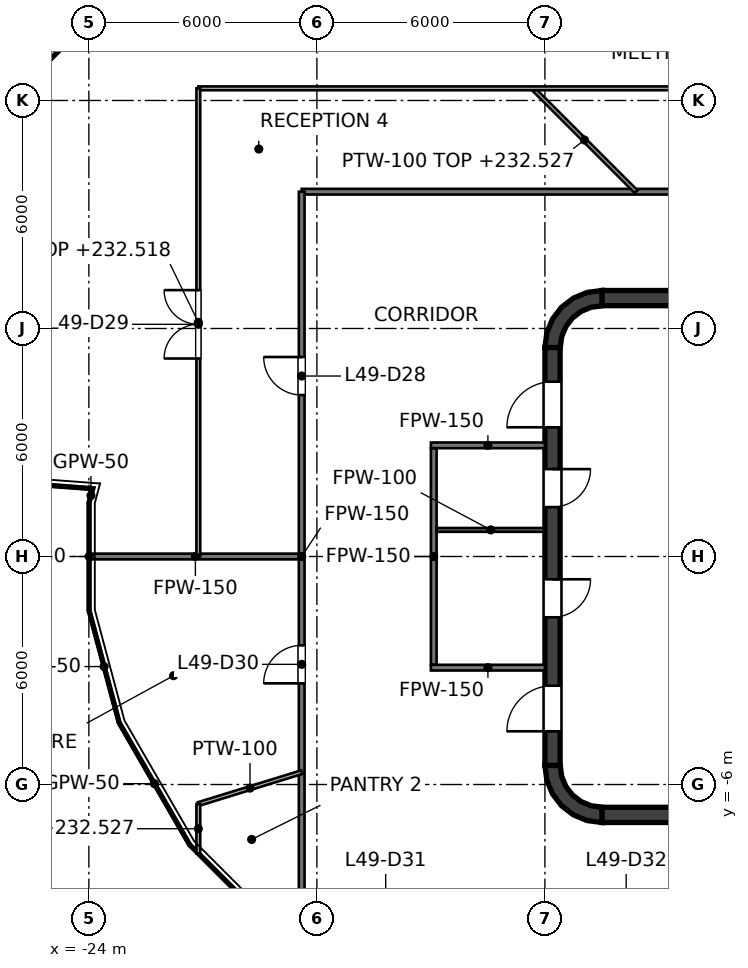
"""IFC4 building model, lengths in metres.
Left out: names, types, materials, properties, quantities, classifications, styles, units other than length and angle.
Written with IfcOpenShell. Run it as: python <this file> out.ifc"""

import sys

from ifc_helpers import new_model, si_unit, direction, frame, frame_2d, origin, place, context, subcontext, project, spatial, polyline, rectangle, outline, extrude, element, fill, save


model = new_model("IFC4")
c1 = context("Model", 3, precision=1e-05, world=origin(), true_north=direction((0.0, 1.0)))
c2 = subcontext(c1, "Body", "Model", "MODEL_VIEW")
j1 = project(units=[si_unit("LENGTHUNIT", "METRE"), si_unit("PLANEANGLEUNIT", "RADIAN")], contexts=[c1])
p1 = place(None, origin())
s1 = spatial("IfcSite", under=j1, at=p1, CompositionType="ELEMENT")
p2 = place(p1, origin())
s2 = spatial("IfcBuilding", under=s1, at=p2, CompositionType="ELEMENT")
p3 = place(p2, frame((0.0, 0.0, 229.6)))
s3 = spatial("IfcBuildingStorey", under=s2, at=p3, CompositionType="ELEMENT", Elevation=229.6)
for number, where, z_axis, x_axis in (
    (1, (-10.5, 6.8, 0.0), (0.0, 0.0, 1.0), (1.0, 0.0, 0.0)),
    (2, (-10.5, -6.8, 0.0), (0.0, 0.0, 1.0), (1.0, 0.0, 0.0)),
):
    element("IfcWall", number, at=place(p3, frame(where, z_axis=z_axis, x_axis=x_axis)), inside=s3, PredefinedType="SHEAR", context=c2, shape_type="SweptSolid", body=[
        extrude(rectangle(XDim=21.0, YDim=0.4, at=frame_2d((10.5, 0.0))), origin(), (0.0, 0.0, 1.0), 4.0),
    ])
p4 = place(p3, frame((-11.8, -5.5, 0.0), z_axis=(0.0, 0.0, 1.0), x_axis=(0.0, 1.0, 0.0)))
e3 = element("IfcWall", 3, at=p4, inside=s3, PredefinedType="SHEAR", context=c2, shape_type="SweptSolid", body=[
    extrude(rectangle(XDim=11.0, YDim=0.4, at=frame_2d((5.5, 0.0))), origin(), (0.0, 0.0, 1.0), 4.0),
])
p5 = place(p4, frame((3.9, 0.0, 0.0)))
e4 = element("IfcOpeningElement", 4, at=p5, cuts=e3, PredefinedType="OPENING", context=c2, shape_type="SweptSolid", body=[
    extrude(rectangle(XDim=1.0, YDim=2.1, at=frame_2d((0.5, 1.05))), frame((0.0, 0.2, 0.0), z_axis=(0.0, -1.0, 0.0), x_axis=(1.0, 0.0, 0.0)), (0.0, 0.0, 1.0), 0.4),
])
p6 = place(p4, frame((6.8, 0.0, 0.0)))
e5 = element("IfcOpeningElement", 5, at=p6, cuts=e3, PredefinedType="OPENING", context=c2, shape_type="SweptSolid", body=[
    extrude(rectangle(XDim=1.0, YDim=2.1, at=frame_2d((0.5, 1.05))), frame((0.0, 0.2, 0.0), z_axis=(0.0, -1.0, 0.0), x_axis=(1.0, 0.0, 0.0)), (0.0, 0.0, 1.0), 0.4),
])
p7 = place(p4, frame((0.9, 0.0, 0.0)))
e6 = element("IfcOpeningElement", 6, at=p7, cuts=e3, PredefinedType="OPENING", context=c2, shape_type="SweptSolid", body=[
    extrude(rectangle(XDim=1.2, YDim=2.1, at=frame_2d((0.6, 1.05))), frame((0.0, 0.2, 0.0), z_axis=(0.0, -1.0, 0.0), x_axis=(1.0, 0.0, 0.0)), (0.0, 0.0, 1.0), 0.4),
])
p8 = place(p4, frame((8.9, 0.0, 0.0)))
e7 = element("IfcOpeningElement", 7, at=p8, cuts=e3, PredefinedType="OPENING", context=c2, shape_type="SweptSolid", body=[
    extrude(rectangle(XDim=1.2, YDim=2.1, at=frame_2d((0.6, 1.05))), frame((0.0, 0.2, 0.0), z_axis=(0.0, -1.0, 0.0), x_axis=(1.0, 0.0, 0.0)), (0.0, 0.0, 1.0), 0.4),
])
p9 = place(p3, origin())
e8 = element("IfcWall", 8, at=p9, inside=s3, PredefinedType="SHEAR", context=c2, shape_type="SweptSolid", body=[
    extrude(outline(polyline([(-12.0, 5.5), (-11.596, 5.5), (-11.559, 5.784), (-11.45, 6.048), (-11.275, 6.275), (-11.048, 6.45), (-10.784, 6.559), (-10.5, 6.596), (-10.5, 7.0), (-10.888, 6.949), (-11.25, 6.799), (-11.561, 6.561), (-11.799, 6.25), (-11.949, 5.888), (-12.0, 5.5)])), origin(), (0.0, 0.0, 1.0), 4.0),
])
e9 = element("IfcWall", 9, at=p9, inside=s3, PredefinedType="SHEAR", context=c2, shape_type="SweptSolid", body=[
    extrude(outline(polyline([(-10.5, -7.0), (-10.5, -6.596), (-10.784, -6.559), (-11.048, -6.45), (-11.275, -6.275), (-11.45, -6.048), (-11.559, -5.784), (-11.596, -5.5), (-12.0, -5.5), (-11.949, -5.888), (-11.799, -6.25), (-11.561, -6.561), (-11.25, -6.799), (-10.888, -6.949), (-10.5, -7.0)])), origin(), (0.0, 0.0, 1.0), 4.0),
])
p10 = place(p3, frame((-9.0, 4.1, 0.0), z_axis=(0.0, 0.0, 1.0), x_axis=(0.0, 1.0, 0.0)))
e10 = element("IfcWall", 10, at=p10, inside=s3, PredefinedType="SOLIDWALL", context=c2, shape_type="SweptSolid", body=[
    extrude(rectangle(XDim=2.5, YDim=0.25, at=frame_2d((1.25, 0.0))), origin(), (0.0, 0.0, 1.0), 3.85),
])
p11 = place(p10, frame((0.65, 0.0, 0.0)))
e11 = element("IfcOpeningElement", 11, at=p11, cuts=e10, PredefinedType="OPENING", context=c2, shape_type="SweptSolid", body=[
    extrude(rectangle(XDim=1.2, YDim=2.1, at=frame_2d((0.6, 1.05))), frame((0.0, 0.125, 0.0), z_axis=(0.0, -1.0, 0.0), x_axis=(1.0, 0.0, 0.0)), (0.0, 0.0, 1.0), 0.25),
])
p12 = place(p3, frame((-9.0, -6.6, 0.0), z_axis=(0.0, 0.0, 1.0), x_axis=(0.0, 1.0, 0.0)))
e12 = element("IfcWall", 12, at=p12, inside=s3, PredefinedType="PARTITIONING", context=c2, shape_type="SweptSolid", body=[
    extrude(rectangle(XDim=2.5, YDim=0.25, at=frame_2d((1.25, 0.0))), origin(), (0.0, 0.0, 1.0), 3.85),
])
p13 = place(p12, frame((0.75, 0.0, 0.0)))
e13 = element("IfcOpeningElement", 13, at=p13, cuts=e12, PredefinedType="OPENING", context=c2, shape_type="SweptSolid", body=[
    extrude(rectangle(XDim=1.0, YDim=2.1, at=frame_2d((0.5, 1.05))), frame((0.0, 0.125, 0.0), z_axis=(0.0, -1.0, 0.0), x_axis=(1.0, 0.0, 0.0)), (0.0, 0.0, 1.0), 0.25),
])
p14 = place(p3, frame((-9.125, 1.525, 0.0), z_axis=(0.0, 0.0, 1.0), x_axis=(1.0, 0.0, 0.0)))
e14 = element("IfcWall", 14, at=p14, inside=s3, PredefinedType="SOLIDWALL", context=c2, shape_type="SweptSolid", body=[
    extrude(rectangle(XDim=8.35, YDim=0.25, at=frame_2d((4.175, 0.0))), origin(), (0.0, 0.0, 1.0), 3.85),
])
p15 = place(p14, frame((0.925, 0.0, 0.0)))
e15 = element("IfcOpeningElement", 15, at=p15, cuts=e14, PredefinedType="OPENING", context=c2, shape_type="SweptSolid", body=[
    extrude(rectangle(XDim=1.1, YDim=2.1, at=frame_2d((0.55, 1.05))), frame((0.0, 0.125, 0.0), z_axis=(0.0, -1.0, 0.0), x_axis=(1.0, 0.0, 0.0)), (0.0, 0.0, 1.0), 0.25),
])
p16 = place(p14, frame((3.625, 0.0, 0.0)))
e16 = element("IfcOpeningElement", 16, at=p16, cuts=e14, PredefinedType="OPENING", context=c2, shape_type="SweptSolid", body=[
    extrude(rectangle(XDim=1.1, YDim=2.1, at=frame_2d((0.55, 1.05))), frame((0.0, 0.125, 0.0), z_axis=(0.0, -1.0, 0.0), x_axis=(1.0, 0.0, 0.0)), (0.0, 0.0, 1.0), 0.25),
])
p17 = place(p14, frame((6.325, 0.0, 0.0)))
e17 = element("IfcOpeningElement", 17, at=p17, cuts=e14, PredefinedType="OPENING", context=c2, shape_type="SweptSolid", body=[
    extrude(rectangle(XDim=1.1, YDim=2.1, at=frame_2d((0.55, 1.05))), frame((0.0, 0.125, 0.0), z_axis=(0.0, -1.0, 0.0), x_axis=(1.0, 0.0, 0.0)), (0.0, 0.0, 1.0), 0.25),
])
p18 = place(p3, frame((-9.125, 3.975, 0.0), z_axis=(0.0, 0.0, 1.0), x_axis=(1.0, 0.0, 0.0)))
e18 = element("IfcWall", 18, at=p18, inside=s3, PredefinedType="SOLIDWALL", context=c2, shape_type="SweptSolid", body=[
    extrude(rectangle(XDim=8.35, YDim=0.25, at=frame_2d((4.175, 0.0))), origin(), (0.0, 0.0, 1.0), 3.85),
])
p19 = place(p3, frame((-9.0, 1.65, 0.0), z_axis=(0.0, 0.0, 1.0), x_axis=(0.0, 1.0, 0.0)))
e19 = element("IfcWall", 19, at=p19, inside=s3, PredefinedType="SOLIDWALL", context=c2, shape_type="SweptSolid", body=[
    extrude(rectangle(XDim=2.2, YDim=0.25, at=frame_2d((1.1, 0.0))), origin(), (0.0, 0.0, 1.0), 3.85),
])
p20 = place(p3, frame((-9.125, -1.525, 0.0), z_axis=(0.0, 0.0, 1.0), x_axis=(1.0, 0.0, 0.0)))
e20 = element("IfcWall", 20, at=p20, inside=s3, PredefinedType="SOLIDWALL", context=c2, shape_type="SweptSolid", body=[
    extrude(rectangle(XDim=18.25, YDim=0.25, at=frame_2d((9.125, 0.0))), origin(), (0.0, 0.0, 1.0), 3.85),
])
p21 = place(p20, frame((7.15, 0.0, 0.0)))
e21 = element("IfcOpeningElement", 21, at=p21, cuts=e20, PredefinedType="OPENING", context=c2, shape_type="SweptSolid", body=[
    extrude(rectangle(XDim=1.2, YDim=2.1, at=frame_2d((0.6, 1.05))), frame((0.0, 0.125, 0.0), z_axis=(0.0, -1.0, 0.0), x_axis=(1.0, 0.0, 0.0)), (0.0, 0.0, 1.0), 0.25),
])
p22 = place(p20, frame((10.2, 0.0, 0.0)))
e22 = element("IfcOpeningElement", 22, at=p22, cuts=e20, PredefinedType="OPENING", context=c2, shape_type="SweptSolid", body=[
    extrude(rectangle(XDim=1.2, YDim=2.1, at=frame_2d((0.6, 1.05))), frame((0.0, 0.125, 0.0), z_axis=(0.0, -1.0, 0.0), x_axis=(1.0, 0.0, 0.0)), (0.0, 0.0, 1.0), 0.25),
])
p23 = place(p20, frame((16.075, 0.0, 0.0)))
e23 = element("IfcOpeningElement", 23, at=p23, cuts=e20, PredefinedType="OPENING", context=c2, shape_type="SweptSolid", body=[
    extrude(rectangle(XDim=1.0, YDim=2.1, at=frame_2d((0.5, 1.05))), frame((0.0, 0.125, 0.0), z_axis=(0.0, -1.0, 0.0), x_axis=(1.0, 0.0, 0.0)), (0.0, 0.0, 1.0), 0.25),
])
p24 = place(p3, frame((-9.125, -3.975, 0.0), z_axis=(0.0, 0.0, 1.0), x_axis=(1.0, 0.0, 0.0)))
e24 = element("IfcWall", 24, at=p24, inside=s3, PredefinedType="SOLIDWALL", context=c2, shape_type="SweptSolid", body=[
    extrude(rectangle(XDim=12.4, YDim=0.25, at=frame_2d((6.2, 0.0))), origin(), (0.0, 0.0, 1.0), 3.85),
])
p25 = place(p24, frame((1.05, 0.0, 0.0)))
e25 = element("IfcOpeningElement", 25, at=p25, cuts=e24, PredefinedType="OPENING", context=c2, shape_type="SweptSolid", body=[
    extrude(rectangle(XDim=1.2, YDim=2.1, at=frame_2d((0.6, 1.05))), frame((0.0, 0.125, 0.0), z_axis=(0.0, -1.0, 0.0), x_axis=(1.0, 0.0, 0.0)), (0.0, 0.0, 1.0), 0.25),
])
p26 = place(p24, frame((4.1, 0.0, 0.0)))
e26 = element("IfcOpeningElement", 26, at=p26, cuts=e24, PredefinedType="OPENING", context=c2, shape_type="SweptSolid", body=[
    extrude(rectangle(XDim=1.2, YDim=2.1, at=frame_2d((0.6, 1.05))), frame((0.0, 0.125, 0.0), z_axis=(0.0, -1.0, 0.0), x_axis=(1.0, 0.0, 0.0)), (0.0, 0.0, 1.0), 0.25),
])
p27 = place(p3, frame((-9.0, -3.85, 0.0), z_axis=(0.0, 0.0, 1.0), x_axis=(0.0, 1.0, 0.0)))
e27 = element("IfcWall", 27, at=p27, inside=s3, PredefinedType="SOLIDWALL", context=c2, shape_type="SweptSolid", body=[
    extrude(rectangle(XDim=2.2, YDim=0.25, at=frame_2d((1.1, 0.0))), origin(), (0.0, 0.0, 1.0), 3.85),
])
p28 = place(p3, frame((-14.925, -2.85, 0.0), z_axis=(0.0, 0.0, 1.0), x_axis=(0.0, 1.0, 0.0)))
e28 = element("IfcWall", 28, at=p28, inside=s3, PredefinedType="PARTITIONING", context=c2, shape_type="SweptSolid", body=[
    extrude(rectangle(XDim=5.7, YDim=0.15, at=frame_2d((2.85, 0.0))), origin(), (0.0, 0.0, 1.0), 2.918),
])
for number, where, z_axis, x_axis in (
    (29, (-15.0, 2.925, 0.0), (0.0, 0.0, 1.0), (1.0, 0.0, 0.0)),
    (30, (-15.0, -2.925, 0.0), (0.0, 0.0, 1.0), (1.0, 0.0, 0.0)),
):
    element("IfcWall", number, at=place(p3, frame(where, z_axis=z_axis, x_axis=x_axis)), inside=s3, PredefinedType="PARTITIONING", context=c2, shape_type="SweptSolid", body=[
        extrude(rectangle(XDim=3.0, YDim=0.15, at=frame_2d((1.5, 0.0))), origin(), (0.0, 0.0, 1.0), 2.918),
    ])
p29 = place(p3, frame((-14.85, 0.7, 0.0), z_axis=(0.0, 0.0, 1.0), x_axis=(1.0, 0.0, 0.0)))
e31 = element("IfcWall", 31, at=p29, inside=s3, PredefinedType="PARTITIONING", context=c2, shape_type="SweptSolid", body=[
    extrude(rectangle(XDim=2.85, YDim=0.1, at=frame_2d((1.425, 0.0))), origin(), (0.0, 0.0, 1.0), 2.918),
])
p30 = place(p3, frame((-23.994, 0.0, 0.0), z_axis=(0.0, 0.0, 1.0), x_axis=(1.0, 0.0, 0.0)))
e32 = element("IfcWall", 32, at=p30, inside=s3, PredefinedType="PARTITIONING", context=c2, shape_type="SweptSolid", body=[
    extrude(rectangle(XDim=5.594, YDim=0.15, at=frame_2d((2.797, 0.0))), origin(), (0.0, 0.0, 1.0), 2.918),
])
p31 = place(p3, frame((-18.4, 9.6, 0.0), z_axis=(0.0, 0.0, 1.0), x_axis=(1.0, 0.0, 0.0)))
e33 = element("IfcWall", 33, at=p31, inside=s3, PredefinedType="PARTITIONING", context=c2, shape_type="SweptSolid", body=[
    extrude(rectangle(XDim=36.8, YDim=0.15, at=frame_2d((18.4, 0.0))), origin(), (0.0, 0.0, 1.0), 2.927),
])
p32 = place(p31, frame((29.991, 0.0, 0.0)))
e34 = element("IfcOpeningElement", 34, at=p32, cuts=e33, PredefinedType="OPENING", context=c2, shape_type="SweptSolid", body=[
    extrude(rectangle(XDim=1.0, YDim=2.1, at=frame_2d((0.5, 1.05))), frame((0.0, 0.075, 0.0), z_axis=(0.0, -1.0, 0.0), x_axis=(1.0, 0.0, 0.0)), (0.0, 0.0, 1.0), 0.15),
])
p33 = place(p31, frame((23.208, 0.0, 0.0)))
e35 = element("IfcOpeningElement", 35, at=p33, cuts=e33, PredefinedType="OPENING", context=c2, shape_type="SweptSolid", body=[
    extrude(rectangle(XDim=1.0, YDim=2.1, at=frame_2d((0.5, 1.05))), frame((0.0, 0.075, 0.0), z_axis=(0.0, -1.0, 0.0), x_axis=(1.0, 0.0, 0.0)), (0.0, 0.0, 1.0), 0.15),
])
p34 = place(p31, frame((18.044, 0.0, 0.0)))
e36 = element("IfcOpeningElement", 36, at=p34, cuts=e33, PredefinedType="OPENING", context=c2, shape_type="SweptSolid", body=[
    extrude(rectangle(XDim=1.0, YDim=2.1, at=frame_2d((0.5, 1.05))), frame((0.0, 0.075, 0.0), z_axis=(0.0, -1.0, 0.0), x_axis=(1.0, 0.0, 0.0)), (0.0, 0.0, 1.0), 0.15),
])
p35 = place(p31, frame((11.814, 0.0, 0.0)))
e37 = element("IfcOpeningElement", 37, at=p35, cuts=e33, PredefinedType="OPENING", context=c2, shape_type="SweptSolid", body=[
    extrude(rectangle(XDim=1.0, YDim=2.1, at=frame_2d((0.5, 1.05))), frame((0.0, 0.075, 0.0), z_axis=(0.0, -1.0, 0.0), x_axis=(1.0, 0.0, 0.0)), (0.0, 0.0, 1.0), 0.15),
])
p36 = place(p3, frame((-18.4, -9.6, 0.0), z_axis=(0.0, 0.0, 1.0), x_axis=(0.0, 1.0, 0.0)))
e38 = element("IfcWall", 38, at=p36, inside=s3, PredefinedType="PARTITIONING", context=c2, shape_type="SweptSolid", body=[
    extrude(rectangle(XDim=19.2, YDim=0.15, at=frame_2d((9.6, 0.0))), origin(), (0.0, 0.0, 1.0), 2.918),
])
p37 = place(p36, frame((13.849, 0.0, 0.0)))
e39 = element("IfcOpeningElement", 39, at=p37, cuts=e38, PredefinedType="OPENING", context=c2, shape_type="SweptSolid", body=[
    extrude(rectangle(XDim=1.0, YDim=2.1, at=frame_2d((0.5, 1.05))), frame((0.0, 0.075, 0.0), z_axis=(0.0, -1.0, 0.0), x_axis=(1.0, 0.0, 0.0)), (0.0, 0.0, 1.0), 0.15),
])
p38 = place(p36, frame((6.262, 0.0, 0.0)))
e40 = element("IfcOpeningElement", 40, at=p38, cuts=e38, PredefinedType="OPENING", context=c2, shape_type="SweptSolid", body=[
    extrude(rectangle(XDim=1.0, YDim=2.1, at=frame_2d((0.5, 1.05))), frame((0.0, 0.075, 0.0), z_axis=(0.0, -1.0, 0.0), x_axis=(1.0, 0.0, 0.0)), (0.0, 0.0, 1.0), 0.15),
])
p39 = place(p3, frame((-23.994, -1.422, 0.0), z_axis=(0.0, 0.0, 1.0), x_axis=(0.258702774174, -0.965956973491, 0.0)))
e41 = element("IfcWall", 41, at=p39, inside=s3, PredefinedType="PARTITIONING", context=c2, shape_type="SweptSolid", body=[
    extrude(rectangle(XDim=3.053, YDim=0.05, at=frame_2d((1.526, 0.0))), origin(), (0.0, 0.0, 1.0), 2.918),
])
p40 = place(p3, frame((-23.204, -4.371, 0.0), z_axis=(0.0, 0.0, 1.0), x_axis=(0.500003477455, -0.866023396066, 0.0)))
e42 = element("IfcWall", 42, at=p40, inside=s3, PredefinedType="PARTITIONING", context=c2, shape_type="SweptSolid", body=[
    extrude(rectangle(XDim=3.71, YDim=0.05, at=frame_2d((1.855, 0.0))), origin(), (0.0, 0.0, 1.0), 2.918),
])
p41 = place(p3, frame((-21.349, -7.584, 0.0), z_axis=(0.0, 0.0, 1.0), x_axis=(0.70713181373, -0.707081747757, 0.0)))
e43 = element("IfcWall", 43, at=p41, inside=s3, PredefinedType="PARTITIONING", context=c2, shape_type="SweptSolid", body=[
    extrude(rectangle(XDim=4.876, YDim=0.05, at=frame_2d((2.438, 0.0))), origin(), (0.0, 0.0, 1.0), 2.927),
])
p42 = place(p3, frame((-30.494, 2.278, 0.0), z_axis=(0.0, 0.0, 1.0), x_axis=(0.997217377811, -0.074548651167, 0.0)))
e44 = element("IfcWall", 44, at=p42, inside=s3, PredefinedType="PARTITIONING", context=c2, shape_type="SweptSolid", body=[
    extrude(rectangle(XDim=6.615, YDim=0.05, at=frame_2d((3.308, 0.0))), origin(), (0.0, 0.0, 1.0), 2.918),
])
p43 = place(p3, frame((-23.994, 1.422, 0.0), z_axis=(0.0, 0.0, 1.0), x_axis=(0.258107743548, 0.966116138319, 0.0)))
e45 = element("IfcWall", 45, at=p43, inside=s3, PredefinedType="PARTITIONING", context=c2, shape_type="SweptSolid", body=[
    extrude(rectangle(XDim=0.375, YDim=0.05, at=frame_2d((0.188, 0.0))), origin(), (0.0, 0.0, 1.0), 2.918),
])
p44 = place(p3, frame((-23.994, -1.422, 0.0), z_axis=(0.0, 0.0, 1.0), x_axis=(0.0, 1.0, 0.0)))
e46 = element("IfcWall", 46, at=p44, inside=s3, PredefinedType="PARTITIONING", context=c2, shape_type="SweptSolid", body=[
    extrude(rectangle(XDim=2.844, YDim=0.05, at=frame_2d((1.422, 0.0))), origin(), (0.0, 0.0, 1.0), 2.918),
])
p45 = place(p3, frame((-12.32, 12.32, 0.0), z_axis=(0.0, 0.0, 1.0), x_axis=(0.707106781187, -0.707106781187, 0.0)))
e47 = element("IfcWall", 47, at=p45, inside=s3, PredefinedType="PARTITIONING", context=c2, shape_type="SweptSolid", body=[
    extrude(rectangle(XDim=3.847, YDim=0.1, at=frame_2d((1.923, 0.0))), origin(), (0.0, 0.0, 1.0), 2.927),
])
p46 = place(p3, frame((-21.12, 12.32, 0.0), z_axis=(0.0, 0.0, 1.0), x_axis=(1.0, 0.0, 0.0)))
e48 = element("IfcWall", 48, at=p46, inside=s3, PredefinedType="PARTITIONING", context=c2, shape_type="SweptSolid", body=[
    extrude(rectangle(XDim=42.24, YDim=0.1, at=frame_2d((21.12, 0.0))), origin(), (0.0, 0.0, 1.0), 2.927),
])
p47 = place(p46, frame((20.419, 0.0, 0.0)))
e49 = element("IfcOpeningElement", 49, at=p47, cuts=e48, PredefinedType="OPENING", context=c2, shape_type="SweptSolid", body=[
    extrude(rectangle(XDim=1.8, YDim=2.1, at=frame_2d((0.9, 1.05))), frame((0.0, 0.05, 0.0), z_axis=(0.0, -1.0, 0.0), x_axis=(1.0, 0.0, 0.0)), (0.0, 0.0, 1.0), 0.1),
])
p48 = place(p3, frame((-21.12, -6.515, 0.0), z_axis=(0.0, 0.0, 1.0), x_axis=(0.955593380923, 0.294688463189, 0.0)))
e50 = element("IfcWall", 50, at=p48, inside=s3, PredefinedType="PARTITIONING", context=c2, shape_type="SweptSolid", body=[
    extrude(rectangle(XDim=2.847, YDim=0.1, at=frame_2d((1.423, 0.0))), origin(), (0.0, 0.0, 1.0), 3.85),
])
p49 = place(p3, frame((-21.12, -7.813, 0.0), z_axis=(0.0, 0.0, 1.0), x_axis=(0.0, 1.0, 0.0)))
e51 = element("IfcWall", 51, at=p49, inside=s3, PredefinedType="PARTITIONING", context=c2, shape_type="SweptSolid", body=[
    extrude(rectangle(XDim=1.298, YDim=0.1, at=frame_2d((0.649, 0.0))), origin(), (0.0, 0.0, 1.0), 2.927),
])
p50 = place(p3, frame((-21.12, 0.0, 0.0), z_axis=(0.0, 0.0, 1.0), x_axis=(0.0, 1.0, 0.0)))
e52 = element("IfcWall", 52, at=p50, inside=s3, PredefinedType="PARTITIONING", context=c2, shape_type="SweptSolid", body=[
    extrude(rectangle(XDim=12.32, YDim=0.1, at=frame_2d((6.16, 0.0))), origin(), (0.0, 0.0, 1.0), 2.918),
])
p51 = place(p50, frame((5.21, 0.0, 0.0)))
e53 = element("IfcOpeningElement", 53, at=p51, cuts=e52, PredefinedType="OPENING", context=c2, shape_type="SweptSolid", body=[
    extrude(rectangle(XDim=1.8, YDim=2.1, at=frame_2d((0.9, 1.05))), frame((0.0, 0.05, 0.0), z_axis=(0.0, -1.0, 0.0), x_axis=(1.0, 0.0, 0.0)), (0.0, 0.0, 1.0), 0.1),
])
p52 = place(p11, origin())
e54 = element("IfcDoor", 54, at=p52, inside=s3, OperationType="SINGLE_SWING_RIGHT", PredefinedType="DOOR", context=c2, shape_type="SweptSolid", body=[
    extrude(rectangle(XDim=1.2, YDim=2.1, at=frame_2d((0.6, 1.05))), frame((0.0, 0.025, 0.0), z_axis=(0.0, -1.0, 0.0), x_axis=(1.0, 0.0, 0.0)), (0.0, 0.0, 1.0), 0.05),
])
fill(e11, e54)
p53 = place(p13, origin())
e55 = element("IfcDoor", 55, at=p53, inside=s3, OperationType="SINGLE_SWING_LEFT", PredefinedType="DOOR", context=c2, shape_type="SweptSolid", body=[
    extrude(rectangle(XDim=1.0, YDim=2.1, at=frame_2d((0.5, 1.05))), frame((0.0, 0.025, 0.0), z_axis=(0.0, -1.0, 0.0), x_axis=(1.0, 0.0, 0.0)), (0.0, 0.0, 1.0), 0.05),
])
fill(e13, e55)
p54 = place(p5, origin())
e56 = element("IfcDoor", 56, at=p54, inside=s3, OperationType="SINGLE_SWING_RIGHT", PredefinedType="DOOR", context=c2, shape_type="SweptSolid", body=[
    extrude(rectangle(XDim=1.0, YDim=2.1, at=frame_2d((0.5, 1.05))), frame((0.0, 0.025, 0.0), z_axis=(0.0, -1.0, 0.0), x_axis=(1.0, 0.0, 0.0)), (0.0, 0.0, 1.0), 0.05),
])
fill(e4, e56)
p55 = place(p6, origin())
e57 = element("IfcDoor", 57, at=p55, inside=s3, OperationType="SINGLE_SWING_RIGHT", PredefinedType="DOOR", context=c2, shape_type="SweptSolid", body=[
    extrude(rectangle(XDim=1.0, YDim=2.1, at=frame_2d((0.5, 1.05))), frame((0.0, 0.025, 0.0), z_axis=(0.0, -1.0, 0.0), x_axis=(1.0, 0.0, 0.0)), (0.0, 0.0, 1.0), 0.05),
])
fill(e5, e57)
p56 = place(p7, origin())
e58 = element("IfcDoor", 58, at=p56, inside=s3, OperationType="SINGLE_SWING_LEFT", PredefinedType="DOOR", context=c2, shape_type="SweptSolid", body=[
    extrude(rectangle(XDim=1.2, YDim=2.1, at=frame_2d((0.6, 1.05))), frame((0.0, 0.025, 0.0), z_axis=(0.0, -1.0, 0.0), x_axis=(1.0, 0.0, 0.0)), (0.0, 0.0, 1.0), 0.05),
])
fill(e6, e58)
p57 = place(p8, origin())
e59 = element("IfcDoor", 59, at=p57, inside=s3, OperationType="SINGLE_SWING_LEFT", PredefinedType="DOOR", context=c2, shape_type="SweptSolid", body=[
    extrude(rectangle(XDim=1.2, YDim=2.1, at=frame_2d((0.6, 1.05))), frame((0.0, 0.025, 0.0), z_axis=(0.0, -1.0, 0.0), x_axis=(1.0, 0.0, 0.0)), (0.0, 0.0, 1.0), 0.05),
])
fill(e7, e59)
p58 = place(p37, origin())
e60 = element("IfcDoor", 60, at=p58, inside=s3, OperationType="SINGLE_SWING_RIGHT", PredefinedType="DOOR", context=c2, shape_type="SweptSolid", body=[
    extrude(rectangle(XDim=1.0, YDim=2.1, at=frame_2d((0.5, 1.05))), frame((0.0, 0.025, 0.0), z_axis=(0.0, -1.0, 0.0), x_axis=(1.0, 0.0, 0.0)), (0.0, 0.0, 1.0), 0.05),
])
fill(e39, e60)
p59 = place(p51, origin())
e61 = element("IfcDoor", 61, at=p59, inside=s3, OperationType="DOUBLE_DOOR_SINGLE_SWING", PredefinedType="DOOR", context=c2, shape_type="SweptSolid", body=[
    extrude(rectangle(XDim=1.8, YDim=2.1, at=frame_2d((0.9, 1.05))), frame((0.0, 0.025, 0.0), z_axis=(0.0, -1.0, 0.0), x_axis=(1.0, 0.0, 0.0)), (0.0, 0.0, 1.0), 0.05),
])
fill(e53, e61)
p60 = place(p38, origin())
e62 = element("IfcDoor", 62, at=p60, inside=s3, OperationType="SINGLE_SWING_LEFT", PredefinedType="DOOR", context=c2, shape_type="SweptSolid", body=[
    extrude(rectangle(XDim=1.0, YDim=2.1, at=frame_2d((0.5, 1.05))), frame((0.0, 0.025, 0.0), z_axis=(0.0, -1.0, 0.0), x_axis=(1.0, 0.0, 0.0)), (0.0, 0.0, 1.0), 0.05),
])
fill(e40, e62)
save(model, sys.argv[1])
